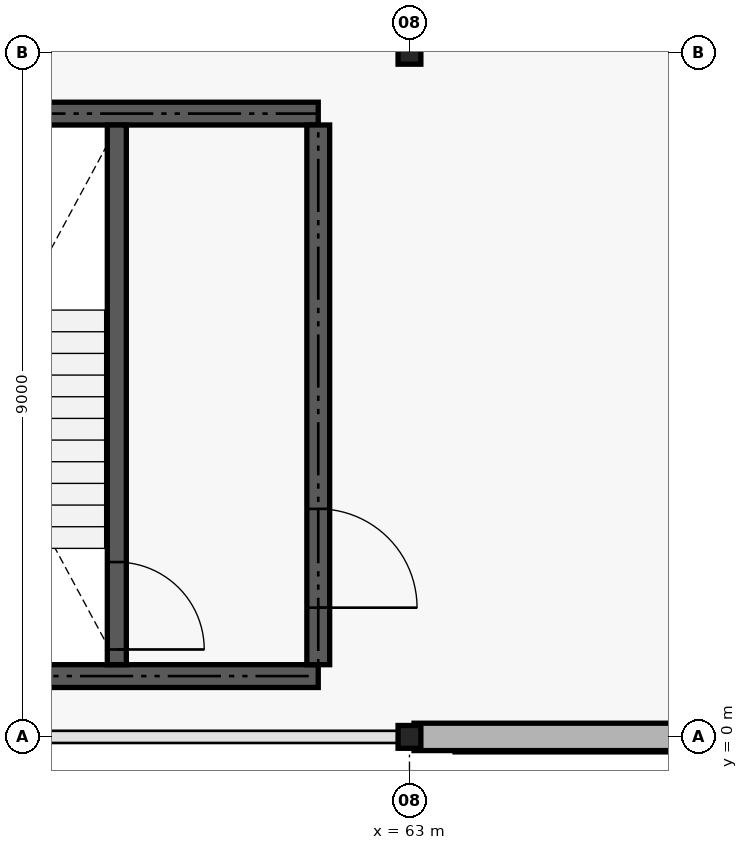
"""IFC4 building model, lengths in metres.
Left out: names, types, materials, properties, quantities, classifications, styles, units other than length and angle.
Written with IfcOpenShell. Run it as: python <this file> out.ifc"""

import sys

from ifc_helpers import new_model, si_unit, direction, frame, frame_2d, origin, origin_2d, place, context, subcontext, project, spatial, rectangle, i_section, extrude, element, fill, save


model = new_model("IFC4")
c1 = context("Model", 3, precision=1e-05, world=origin(), true_north=direction((0.0, 1.0)))
c2 = subcontext(c1, "Body", "Model", "MODEL_VIEW")
j1 = project(units=[si_unit("LENGTHUNIT", "METRE"), si_unit("PLANEANGLEUNIT", "RADIAN")], contexts=[c1])
p1 = place(None, origin())
s1 = spatial("IfcSite", under=j1, at=p1, CompositionType="ELEMENT")
p2 = place(p1, origin())
s2 = spatial("IfcBuilding", under=s1, at=p2, CompositionType="ELEMENT")
p3 = place(p2, frame((0.0, 0.0, 9.6)))
s3 = spatial("IfcBuildingStorey", under=s2, at=p3, CompositionType="ELEMENT", Elevation=9.6)
for number, where, z_axis, x_axis in (
    (1, (63.0, 0.0, 0.0), (0.0, 0.0, 1.0), (1.0, 0.0, 0.0)),
    (2, (63.0, 9.0, 0.0), (0.0, 0.0, 1.0), (1.0, 0.0, 0.0)),
):
    element("IfcColumn", number, at=place(p3, frame(where, z_axis=z_axis, x_axis=x_axis)), inside=s3, PredefinedType="COLUMN", context=c2, shape_type="SweptSolid", body=[
        extrude(i_section(OverallWidth=0.3, OverallDepth=0.3, WebThickness=0.011, FlangeThickness=0.019, FilletRadius=0.027, at=origin_2d()), origin(), (0.0, 0.0, 1.0), 3.9),
    ])
p4 = place(p3, frame((63.06, 0.0, 0.0), z_axis=(0.0, 0.0, 1.0), x_axis=(1.0, 0.0, 0.0)))
e3 = element("IfcWall", 3, at=p4, inside=s3, PredefinedType="SOLIDWALL", context=c2, shape_type="SweptSolid", body=[
    extrude(rectangle(XDim=8.88, YDim=0.36, at=frame_2d((4.44, 0.0))), origin(), (0.0, 0.0, 1.0), 3.25),
])
for number, where, z_axis, x_axis in (
    (4, (55.2, 0.8, 0.0), (0.0, 0.0, 1.0), (1.0, 0.0, 0.0)),
    (5, (55.2, 8.2, 0.0), (0.0, 0.0, 1.0), (1.0, 0.0, 0.0)),
):
    element("IfcWall", number, at=place(p3, frame(where, z_axis=z_axis, x_axis=x_axis)), inside=s3, PredefinedType="SHEAR", context=c2, shape_type="SweptSolid", body=[
        extrude(rectangle(XDim=6.6, YDim=0.3, at=frame_2d((3.3, 0.0))), origin(), (0.0, 0.0, 1.0), 3.9),
    ])
p5 = place(p3, frame((61.8, 0.95, 0.0), z_axis=(0.0, 0.0, 1.0), x_axis=(0.0, 1.0, 0.0)))
e6 = element("IfcWall", 6, at=p5, inside=s3, PredefinedType="SHEAR", context=c2, shape_type="SweptSolid", body=[
    extrude(rectangle(XDim=7.1, YDim=0.3, at=frame_2d((3.55, 0.0))), origin(), (0.0, 0.0, 1.0), 3.9),
])
p6 = place(p5, frame((0.75, 0.0, 0.0)))
e7 = element("IfcOpeningElement", 7, at=p6, cuts=e6, PredefinedType="OPENING", context=c2, shape_type="SweptSolid", body=[
    extrude(rectangle(XDim=1.3, YDim=2.15, at=frame_2d((0.65, 1.075))), frame((0.0, 0.16, 0.0), z_axis=(0.0, -1.0, 0.0), x_axis=(1.0, 0.0, 0.0)), (0.0, 0.0, 1.0), 0.32),
])
p7 = place(p3, frame((59.15, 0.95, 0.0), z_axis=(0.0, 0.0, 1.0), x_axis=(0.0, 1.0, 0.0)))
e8 = element("IfcWall", 8, at=p7, inside=s3, PredefinedType="SHEAR", context=c2, shape_type="SweptSolid", body=[
    extrude(rectangle(XDim=7.1, YDim=0.25, at=frame_2d((3.55, 0.0))), origin(), (0.0, 0.0, 1.0), 3.9),
])
p8 = place(p7, frame((0.2, 0.0, 0.0)))
e9 = element("IfcOpeningElement", 9, at=p8, cuts=e8, PredefinedType="OPENING", context=c2, shape_type="SweptSolid", body=[
    extrude(rectangle(XDim=1.15, YDim=2.15, at=frame_2d((0.575, 1.075))), frame((0.0, 0.135, 0.0), z_axis=(0.0, -1.0, 0.0), x_axis=(1.0, 0.0, 0.0)), (0.0, 0.0, 1.0), 0.27),
])
p9 = place(p6, frame((1.3, 0.0, 0.0), z_axis=(0.0, 0.0, 1.0), x_axis=(-1.0, 0.0, 0.0)))
e10 = element("IfcDoor", 10, at=p9, inside=s3, OperationType="DOUBLE_DOOR_SINGLE_SWING", PredefinedType="DOOR", context=c2, shape_type="SweptSolid", body=[
    extrude(rectangle(XDim=1.3, YDim=2.15, at=frame_2d((0.65, 1.075))), frame((0.0, 0.025, 0.0), z_axis=(0.0, -1.0, 0.0), x_axis=(1.0, 0.0, 0.0)), (0.0, 0.0, 1.0), 0.05),
])
fill(e7, e10)
p10 = place(p8, frame((1.15, 0.0, 0.0), z_axis=(0.0, 0.0, 1.0), x_axis=(-1.0, 0.0, 0.0)))
e11 = element("IfcDoor", 11, at=p10, inside=s3, OperationType="SINGLE_SWING_LEFT", PredefinedType="DOOR", context=c2, shape_type="SweptSolid", body=[
    extrude(rectangle(XDim=1.15, YDim=2.15, at=frame_2d((0.575, 1.075))), frame((0.0, 0.025, 0.0), z_axis=(0.0, -1.0, 0.0), x_axis=(1.0, 0.0, 0.0)), (0.0, 0.0, 1.0), 0.05),
])
fill(e9, e11)
save(model, sys.argv[1])
